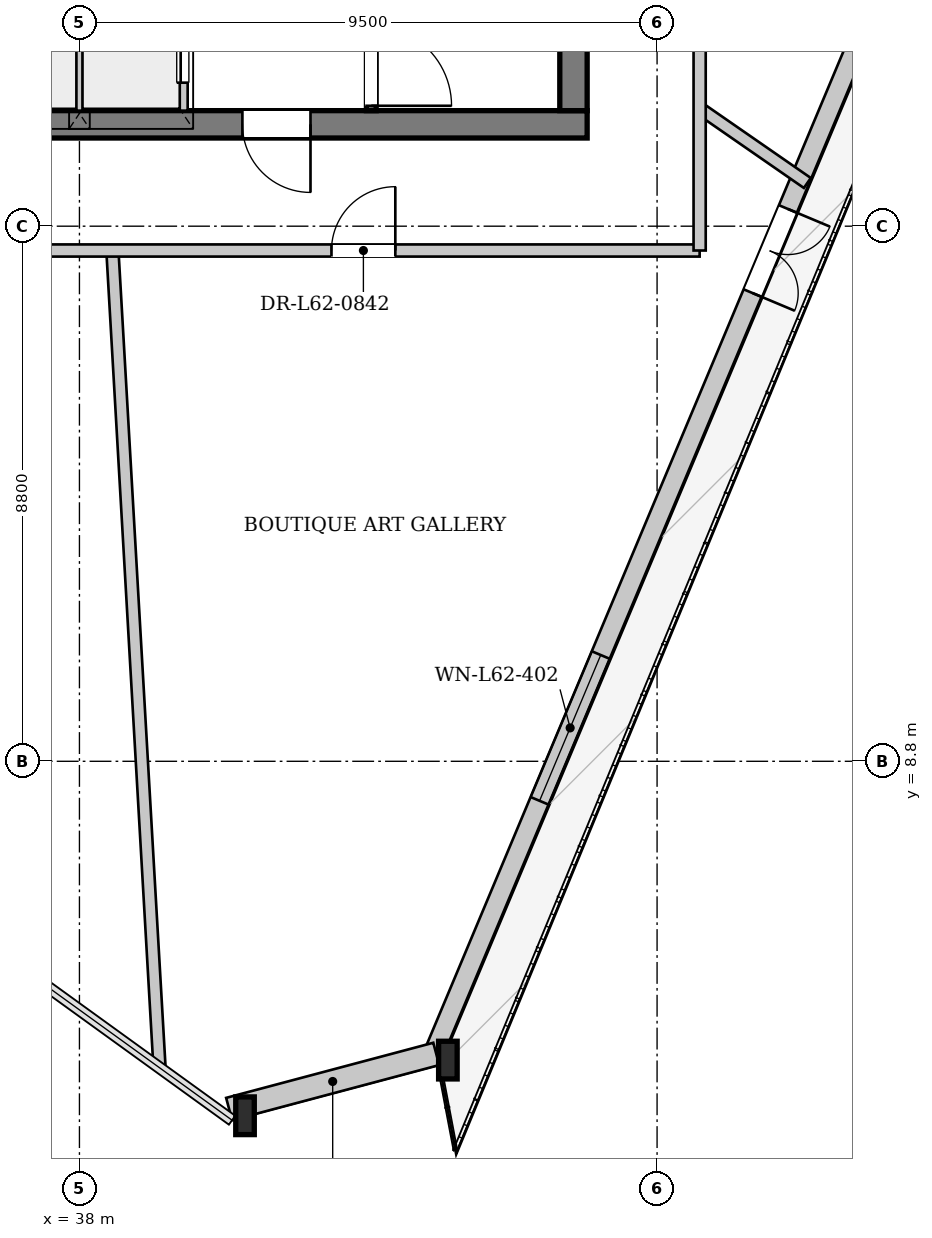
"""IFC4 building model, lengths in metres.
Left out: names, types, materials, properties, quantities, classifications, styles, units other than length and angle.
Written with IfcOpenShell. Run it as: python <this file> out.ifc"""

import sys

from ifc_helpers import new_model, si_unit, direction, frame, frame_2d, origin, origin_2d, place, context, subcontext, project, spatial, rectangle, i_section, extrude, source, transform, mapped, element, fill, save


model = new_model("IFC4")
c1 = context("Model", 3, precision=1e-05, world=origin(), true_north=direction((0.0, 1.0)))
c2 = subcontext(c1, "Body", "Model", "MODEL_VIEW")
j1 = project(units=[si_unit("LENGTHUNIT", "METRE"), si_unit("PLANEANGLEUNIT", "RADIAN")], contexts=[c1])
p1 = place(None, origin())
s1 = spatial("IfcSite", under=j1, at=p1, CompositionType="ELEMENT")
p2 = place(p1, origin())
s2 = spatial("IfcBuilding", under=s1, at=p2, CompositionType="ELEMENT")
p3 = place(p2, frame((0.0, 0.0, 234.5)))
s3 = spatial("IfcBuildingStorey", under=s2, at=p3, CompositionType="ELEMENT", Elevation=234.5)
m1 = source(origin(), c2, "Body", "SweptSolid", [
    extrude(i_section(OverallWidth=0.305, OverallDepth=0.62, WebThickness=0.021, FlangeThickness=0.04, at=origin_2d()), origin(), (0.0, 0.0, 1.0), 3.464),
])
p4 = place(p3, frame((40.51, 2.898, 0.0), z_axis=(0.122692438195, 0.042212964089, 0.991546585528), x_axis=(-0.32533780478, 0.945597859971, 0.0)))
e1 = element("IfcColumn", 1, at=p4, inside=s3, PredefinedType="COLUMN", context=c2, shape_type="MappedRepresentation", body=[
    mapped(m1, transform((0.0, 0.0, 0.0), x_axis=(1.0, 0.0, 0.0), y_axis=(0.0, 1.0, 0.0), z_axis=(0.0, 0.0, 1.0), scale=1.0)),
])
m2 = source(origin(), c2, "Body", "SweptSolid", [
    extrude(i_section(OverallWidth=0.305, OverallDepth=0.62, WebThickness=0.021, FlangeThickness=0.04, at=origin_2d()), origin(), (0.0, 0.0, 1.0), 3.451),
])
p5 = place(p3, frame((43.917, 3.804, 0.0), z_axis=(0.082284317095, 0.047474442623, 0.995477507761), x_axis=(-0.499743945175, 0.866173186644, 0.0)))
e2 = element("IfcColumn", 2, at=p5, inside=s3, PredefinedType="COLUMN", context=c2, shape_type="MappedRepresentation", body=[
    mapped(m2, transform((0.0, 0.0, 0.0), x_axis=(1.0, 0.0, 0.0), y_axis=(0.0, 1.0, 0.0), z_axis=(0.0, 0.0, 1.0), scale=1.0)),
])
p6 = place(p3, frame((52.618, 24.954, 0.0), z_axis=(0.0, 0.0, 1.0), x_axis=(-0.386897414412, -0.922122763368, 0.0)))
e3 = element("IfcWall", 3, at=p6, inside=s3, PredefinedType="SOLIDWALL", context=c2, shape_type="SweptSolid", body=[
    extrude(rectangle(XDim=22.869, YDim=0.32, at=frame_2d((11.435, 0.0))), origin(), (0.0, 0.0, 1.0), 2.872),
])
p7 = place(p6, frame((7.668, 0.0, 0.0)))
e4 = element("IfcOpeningElement", 4, at=p7, cuts=e3, PredefinedType="OPENING", context=c2, shape_type="SweptSolid", body=[
    extrude(rectangle(XDim=1.5, YDim=2.3, at=frame_2d((0.75, 1.15))), frame((0.0, 0.17, 0.0), z_axis=(0.0, -1.0, 0.0), x_axis=(1.0, 0.0, 0.0)), (0.0, 0.0, 1.0), 0.34),
])
p8 = place(p6, frame((15.623, 0.0, 0.402)))
e5 = element("IfcOpeningElement", 5, at=p8, cuts=e3, PredefinedType="OPENING", context=c2, shape_type="SweptSolid", body=[
    extrude(rectangle(XDim=2.6, YDim=2.35, at=frame_2d((1.3, 1.175))), frame((0.0, 0.17, 0.0), z_axis=(0.0, -1.0, 0.0), x_axis=(1.0, 0.0, 0.0)), (0.0, 0.0, 1.0), 0.34),
])
p9 = place(p3, frame((43.868, 3.988, 0.0), z_axis=(0.0, 0.0, 1.0), x_axis=(-0.96637388207, -0.25714105089, 0.0)))
e6 = element("IfcWall", 6, at=p9, inside=s3, PredefinedType="SOLIDWALL", context=c2, shape_type="SweptSolid", body=[
    extrude(rectangle(XDim=3.525, YDim=0.38, at=frame_2d((1.763, 0.0))), origin(), (0.0, 0.0, 1.0), 2.872),
])
p10 = place(p3, frame((46.35, 19.275, 0.0), z_axis=(0.0, 0.0, 1.0), x_axis=(-1.0, 0.0, 0.0)))
e7 = element("IfcWall", 7, at=p10, inside=s3, PredefinedType="SHEAR", context=c2, shape_type="SweptSolid", body=[
    extrude(rectangle(XDim=16.7, YDim=0.45, at=frame_2d((8.35, 0.0))), origin(), (0.0, 0.0, 1.0), 3.38),
])
p11 = place(p10, frame((4.55, 0.0, 0.0)))
e8 = element("IfcOpeningElement", 8, at=p11, cuts=e7, PredefinedType="OPENING", context=c2, shape_type="SweptSolid", body=[
    extrude(rectangle(XDim=1.12, YDim=2.25, at=frame_2d((0.56, 1.125))), frame((0.0, 0.235, 0.0), z_axis=(0.0, -1.0, 0.0), x_axis=(1.0, 0.0, 0.0)), (0.0, 0.0, 1.0), 0.47),
])
p12 = place(p10, frame((11.05, 0.0, 0.0)))
e9 = element("IfcOpeningElement", 9, at=p12, cuts=e7, PredefinedType="OPENING", context=c2, shape_type="SweptSolid", body=[
    extrude(rectangle(XDim=1.12, YDim=2.25, at=frame_2d((0.56, 1.125))), frame((0.0, 0.235, 0.0), z_axis=(0.0, -1.0, 0.0), x_axis=(1.0, 0.0, 0.0)), (0.0, 0.0, 1.0), 0.47),
])
p13 = place(p3, frame((46.125, 33.7, 0.0), z_axis=(0.0, 0.0, 1.0), x_axis=(0.0, -1.0, 0.0)))
e10 = element("IfcWall", 10, at=p13, inside=s3, PredefinedType="SHEAR", context=c2, shape_type="SweptSolid", body=[
    extrude(rectangle(XDim=14.2, YDim=0.45, at=frame_2d((7.1, 0.0))), origin(), (0.0, 0.0, 1.0), 3.38),
])
p14 = place(p13, frame((5.18, 0.0, 0.0)))
e11 = element("IfcOpeningElement", 11, at=p14, cuts=e10, PredefinedType="OPENING", context=c2, shape_type="SweptSolid", body=[
    extrude(rectangle(XDim=1.6, YDim=2.2, at=frame_2d((0.8, 1.1))), frame((0.0, 0.235, 0.0), z_axis=(0.0, -1.0, 0.0), x_axis=(1.0, 0.0, 0.0)), (0.0, 0.0, 1.0), 0.47),
])
p15 = place(p13, frame((2.05, 0.0, 0.0)))
e12 = element("IfcOpeningElement", 12, at=p15, cuts=e10, PredefinedType="OPENING", context=c2, shape_type="SweptSolid", body=[
    extrude(rectangle(XDim=0.95, YDim=2.1, at=frame_2d((0.475, 1.05))), frame((0.0, 0.235, 0.0), z_axis=(0.0, -1.0, 0.0), x_axis=(1.0, 0.0, 0.0)), (0.0, 0.0, 1.0), 0.47),
])
p16 = place(p3, frame((42.8, 26.96, 0.0), z_axis=(0.0, 0.0, 1.0), x_axis=(0.0, -1.0, 0.0)))
e13 = element("IfcWall", 13, at=p16, inside=s3, PredefinedType="PARTITIONING", context=c2, shape_type="SweptSolid", body=[
    extrude(rectangle(XDim=7.46, YDim=0.16, at=frame_2d((3.73, 0.0))), origin(), (0.0, 0.0, 1.0), 3.38),
])
p17 = place(p16, frame((6.06, 0.0, 0.0)))
e14 = element("IfcOpeningElement", 14, at=p17, cuts=e13, PredefinedType="OPENING", context=c2, shape_type="SweptSolid", body=[
    extrude(rectangle(XDim=1.32, YDim=2.2, at=frame_2d((0.66, 1.1))), frame((0.0, 0.09, 0.0), z_axis=(0.0, -1.0, 0.0), x_axis=(1.0, 0.0, 0.0)), (0.0, 0.0, 1.0), 0.18),
])
p18 = place(p3, frame((39.7, 24.28, 0.0), z_axis=(0.0, 0.0, 1.0), x_axis=(0.0, -1.0, 0.0)))
e15 = element("IfcWall", 15, at=p18, inside=s3, PredefinedType="PARTITIONING", context=c2, shape_type="SweptSolid", body=[
    extrude(rectangle(XDim=4.78, YDim=0.16, at=frame_2d((2.39, 0.0))), origin(), (0.0, 0.0, 1.0), 3.38),
])
p19 = place(p18, frame((3.12, 0.0, 0.0)))
e16 = element("IfcOpeningElement", 16, at=p19, cuts=e15, PredefinedType="OPENING", context=c2, shape_type="SweptSolid", body=[
    extrude(rectangle(XDim=1.2, YDim=2.2, at=frame_2d((0.6, 1.1))), frame((0.0, 0.09, 0.0), z_axis=(0.0, -1.0, 0.0), x_axis=(1.0, 0.0, 0.0)), (0.0, 0.0, 1.0), 0.18),
])
p20 = place(p3, frame((38.0, 19.5, 0.0), z_axis=(0.0, 0.0, 1.0), x_axis=(0.0, 1.0, 0.0)))
e17 = element("IfcWall", 17, at=p20, inside=s3, PredefinedType="PARTITIONING", context=c2, shape_type="SweptSolid", body=[
    extrude(rectangle(XDim=2.46, YDim=0.125, at=frame_2d((1.23, 0.0))), origin(), (0.0, 0.0, 1.0), 3.38),
])
p21 = place(p3, frame((38.542, 17.2, 0.0), z_axis=(0.0, 0.0, 1.0), x_axis=(0.057565160189, -0.998341751272, 0.0)))
e18 = element("IfcWall", 18, at=p21, inside=s3, PredefinedType="PARTITIONING", context=c2, shape_type="SweptSolid", body=[
    extrude(rectangle(XDim=13.423, YDim=0.2, at=frame_2d((6.711, 0.0))), origin(), (0.0, 0.0, 1.0), 3.38),
])
p22 = place(p3, frame((48.2, 19.537, 0.0), z_axis=(0.0, 0.0, 1.0), x_axis=(0.822159557719, -0.569257113834, 0.0)))
e19 = element("IfcWall", 19, at=p22, inside=s3, PredefinedType="PARTITIONING", context=c2, shape_type="SweptSolid", body=[
    extrude(rectangle(XDim=2.155, YDim=0.2, at=frame_2d((1.077, 0.0))), origin(), (0.0, 0.0, 1.0), 3.38),
])
p23 = place(p3, frame((27.8, 17.2, 0.0), z_axis=(0.0, 0.0, 1.0), x_axis=(1.0, 0.0, 0.0)))
e20 = element("IfcWall", 20, at=p23, inside=s3, PredefinedType="PARTITIONING", context=c2, shape_type="SweptSolid", body=[
    extrude(rectangle(XDim=20.4, YDim=0.2, at=frame_2d((10.2, 0.0))), origin(), (0.0, 0.0, 1.0), 3.38),
])
p24 = place(p23, frame((7.636, 0.0, 0.0)))
e21 = element("IfcOpeningElement", 21, at=p24, cuts=e20, PredefinedType="OPENING", context=c2, shape_type="SweptSolid", body=[
    extrude(rectangle(XDim=1.05, YDim=2.2, at=frame_2d((0.525, 1.1))), frame((0.0, 0.11, 0.0), z_axis=(0.0, -1.0, 0.0), x_axis=(1.0, 0.0, 0.0)), (0.0, 0.0, 1.0), 0.22),
])
p25 = place(p23, frame((14.345, 0.0, 0.0)))
e22 = element("IfcOpeningElement", 22, at=p25, cuts=e20, PredefinedType="OPENING", context=c2, shape_type="SweptSolid", body=[
    extrude(rectangle(XDim=1.05, YDim=2.2, at=frame_2d((0.525, 1.1))), frame((0.0, 0.11, 0.0), z_axis=(0.0, -1.0, 0.0), x_axis=(1.0, 0.0, 0.0)), (0.0, 0.0, 1.0), 0.22),
])
p26 = place(p3, frame((48.2, 17.2, 0.0), z_axis=(0.0, 0.0, 1.0), x_axis=(0.0, 1.0, 0.0)))
e23 = element("IfcWall", 23, at=p26, inside=s3, PredefinedType="PARTITIONING", context=c2, shape_type="SweptSolid", body=[
    extrude(rectangle(XDim=18.8, YDim=0.2, at=frame_2d((9.4, 0.0))), origin(), (0.0, 0.0, 1.0), 3.065),
])
p27 = place(p26, frame((4.507, 0.0, 0.0)))
e24 = element("IfcOpeningElement", 24, at=p27, cuts=e23, PredefinedType="OPENING", context=c2, shape_type="SweptSolid", body=[
    extrude(rectangle(XDim=1.05, YDim=2.2, at=frame_2d((0.525, 1.1))), frame((0.0, 0.11, 0.0), z_axis=(0.0, -1.0, 0.0), x_axis=(1.0, 0.0, 0.0)), (0.0, 0.0, 1.0), 0.22),
])
p28 = place(p26, frame((17.45, 0.0, 0.0)))
e25 = element("IfcOpeningElement", 25, at=p28, cuts=e23, PredefinedType="OPENING", context=c2, shape_type="SweptSolid", body=[
    extrude(rectangle(XDim=1.05, YDim=2.2, at=frame_2d((0.525, 1.1))), frame((0.0, 0.11, 0.0), z_axis=(0.0, -1.0, 0.0), x_axis=(1.0, 0.0, 0.0)), (0.0, 0.0, 1.0), 0.22),
])
m3 = source(origin(), c2, "Body", "SweptSolid", [
    extrude(rectangle(XDim=1.5, YDim=2.3, at=frame_2d((0.75, 1.15))), frame((0.0, 0.025, 0.0), z_axis=(0.0, -1.0, 0.0), x_axis=(1.0, 0.0, 0.0)), (0.0, 0.0, 1.0), 0.05),
])
p29 = place(p7, origin())
e26 = element("IfcDoor", 26, at=p29, inside=s3, OperationType="DOUBLE_DOOR_SINGLE_SWING", PredefinedType="DOOR", context=c2, shape_type="MappedRepresentation", body=[
    mapped(m3, transform((0.0, 0.0, 0.0), x_axis=(1.0, 0.0, 0.0), y_axis=(0.0, 1.0, 0.0), z_axis=(0.0, 0.0, 1.0), scale=1.0)),
])
fill(e4, e26)
m4 = source(origin(), c2, "Body", "SweptSolid", [
    extrude(rectangle(XDim=2.6, YDim=2.35, at=frame_2d((1.3, 1.175))), frame((0.0, 0.03, 0.0), z_axis=(0.0, -1.0, 0.0), x_axis=(1.0, 0.0, 0.0)), (0.0, 0.0, 1.0), 0.06),
])
p30 = place(p8, origin())
e27 = element("IfcWindow", 27, at=p30, inside=s3, PartitioningType="SINGLE_PANEL", PredefinedType="WINDOW", context=c2, shape_type="MappedRepresentation", body=[
    mapped(m4, transform((0.0, 0.0, 0.0), x_axis=(1.0, 0.0, 0.0), y_axis=(0.0, 1.0, 0.0), z_axis=(0.0, 0.0, 1.0), scale=1.0)),
])
fill(e5, e27)
m5 = source(origin(), c2, "Body", "SweptSolid", [
    extrude(rectangle(XDim=1.12, YDim=2.25, at=frame_2d((0.56, 1.125))), frame((0.0, 0.025, 0.0), z_axis=(0.0, -1.0, 0.0), x_axis=(1.0, 0.0, 0.0)), (0.0, 0.0, 1.0), 0.05),
])
p31 = place(p11, origin())
e28 = element("IfcDoor", 28, at=p31, inside=s3, OperationType="SINGLE_SWING_LEFT", PredefinedType="DOOR", context=c2, shape_type="MappedRepresentation", body=[
    mapped(m5, transform((0.0, 0.0, 0.0), x_axis=(1.0, 0.0, 0.0), y_axis=(0.0, 1.0, 0.0), z_axis=(0.0, 0.0, 1.0), scale=1.0)),
])
fill(e8, e28)
m6 = source(origin(), c2, "Body", "SweptSolid", [
    extrude(rectangle(XDim=1.32, YDim=2.2, at=frame_2d((0.66, 1.1))), frame((0.0, 0.025, 0.0), z_axis=(0.0, -1.0, 0.0), x_axis=(1.0, 0.0, 0.0)), (0.0, 0.0, 1.0), 0.05),
])
p32 = place(p17, origin())
e29 = element("IfcDoor", 29, at=p32, inside=s3, OperationType="SINGLE_SWING_RIGHT", PredefinedType="DOOR", context=c2, shape_type="MappedRepresentation", body=[
    mapped(m6, transform((0.0, 0.0, 0.0), x_axis=(1.0, 0.0, 0.0), y_axis=(0.0, 1.0, 0.0), z_axis=(0.0, 0.0, 1.0), scale=1.0)),
])
fill(e14, e29)
m7 = source(origin(), c2, "Body", "SweptSolid", [
    extrude(rectangle(XDim=1.2, YDim=2.2, at=frame_2d((0.6, 1.1))), frame((0.0, 0.025, 0.0), z_axis=(0.0, -1.0, 0.0), x_axis=(1.0, 0.0, 0.0)), (0.0, 0.0, 1.0), 0.05),
])
p33 = place(p19, origin())
e30 = element("IfcDoor", 30, at=p33, inside=s3, OperationType="DOUBLE_DOOR_SLIDING", PredefinedType="DOOR", context=c2, shape_type="MappedRepresentation", body=[
    mapped(m7, transform((0.0, 0.0, 0.0), x_axis=(1.0, 0.0, 0.0), y_axis=(0.0, 1.0, 0.0), z_axis=(0.0, 0.0, 1.0), scale=1.0)),
])
fill(e16, e30)
m8 = source(origin(), c2, "Body", "SweptSolid", [
    extrude(rectangle(XDim=1.05, YDim=2.2, at=frame_2d((0.525, 1.1))), frame((0.0, 0.025, 0.0), z_axis=(0.0, -1.0, 0.0), x_axis=(1.0, 0.0, 0.0)), (0.0, 0.0, 1.0), 0.05),
])
p34 = place(p25, origin())
e31 = element("IfcDoor", 31, at=p34, inside=s3, OperationType="SINGLE_SWING_RIGHT", PredefinedType="DOOR", context=c2, shape_type="MappedRepresentation", body=[
    mapped(m8, transform((0.0, 0.0, 0.0), x_axis=(1.0, 0.0, 0.0), y_axis=(0.0, 1.0, 0.0), z_axis=(0.0, 0.0, 1.0), scale=1.0)),
])
fill(e22, e31)
save(model, sys.argv[1])
